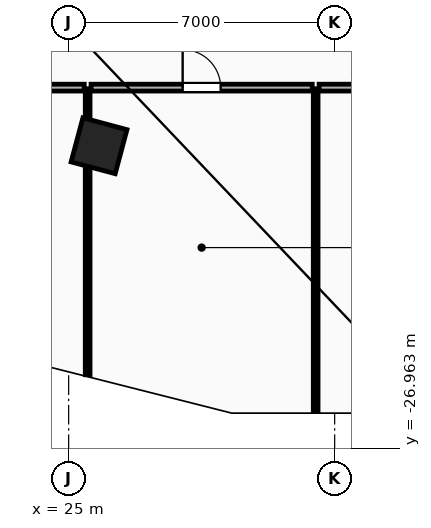
"""IFC4 building model, lengths in metres.
Left out: names, types, materials, properties, quantities, classifications, styles, units other than length and angle.
Written with IfcOpenShell. Run it as: python <this file> out.ifc"""

import sys

from ifc_helpers import new_model, si_unit, direction, frame, frame_2d, origin, origin_2d, place, context, subcontext, project, spatial, rectangle, extrude, element, fill, save


model = new_model("IFC4")
c1 = context("Model", 3, precision=1e-05, world=origin(), true_north=direction((0.0, 1.0)))
c2 = subcontext(c1, "Body", "Model", "MODEL_VIEW")
j1 = project(units=[si_unit("LENGTHUNIT", "METRE"), si_unit("PLANEANGLEUNIT", "RADIAN")], contexts=[c1])
p1 = place(None, origin())
s1 = spatial("IfcSite", under=j1, at=p1, CompositionType="ELEMENT")
p2 = place(p1, origin())
s2 = spatial("IfcBuilding", under=s1, at=p2, CompositionType="ELEMENT")
p3 = place(p2, frame((0.0, 0.0, 69.6)))
s3 = spatial("IfcBuildingStorey", under=s2, at=p3, CompositionType="ELEMENT", Elevation=69.6)
p4 = place(p3, frame((25.8, -19.0, 0.0), z_axis=(0.0, 0.0, 1.0), x_axis=(0.965970984022, -0.258650455301, 0.0)))
e1 = element("IfcColumn", 1, at=p4, inside=s3, PredefinedType="COLUMN", context=c2, shape_type="SweptSolid", body=[
    extrude(rectangle(XDim=1.2, YDim=1.2, at=origin_2d()), origin(), (0.0, 0.0, 1.0), 3.8),
])
p5 = place(p3, frame((25.5, -25.025, 0.0), z_axis=(0.0, 0.0, 1.0), x_axis=(0.0, 1.0, 0.0)))
e2 = element("IfcWall", 2, at=p5, inside=s3, PredefinedType="PARTITIONING", context=c2, shape_type="SweptSolid", body=[
    extrude(rectangle(XDim=7.525, YDim=0.125, at=frame_2d((3.762, 0.0))), origin(), (0.0, 0.0, 1.0), 3.5),
])
p6 = place(p3, frame((31.5, -25.985, 0.0), z_axis=(0.0, 0.0, 1.0), x_axis=(0.0, 1.0, 0.0)))
e3 = element("IfcWall", 3, at=p6, inside=s3, PredefinedType="PARTITIONING", context=c2, shape_type="SweptSolid", body=[
    extrude(rectangle(XDim=8.485, YDim=0.125, at=frame_2d((4.243, 0.0))), origin(), (0.0, 0.0, 1.0), 3.5),
])
p7 = place(p3, frame((25.59, -17.47, 0.0), z_axis=(0.0, 0.0, 1.0), x_axis=(1.0, 0.0, 0.0)))
e4 = element("IfcWall", 4, at=p7, inside=s3, PredefinedType="PARTITIONING", context=c2, shape_type="SweptSolid", body=[
    extrude(rectangle(XDim=5.82, YDim=0.18, at=frame_2d((2.91, 0.0))), origin(), (0.0, 0.0, 1.0), 3.5),
])
p8 = place(p7, frame((2.41, 0.0, 0.0)))
e5 = element("IfcOpeningElement", 5, at=p8, cuts=e4, PredefinedType="OPENING", context=c2, shape_type="SweptSolid", body=[
    extrude(rectangle(XDim=1.0, YDim=2.15, at=frame_2d((0.5, 1.075))), frame((0.0, 0.1, 0.0), z_axis=(0.0, -1.0, 0.0), x_axis=(1.0, 0.0, 0.0)), (0.0, 0.0, 1.0), 0.2),
])
p9 = place(p3, frame((16.822, -17.47, 0.0), z_axis=(0.0, 0.0, 1.0), x_axis=(1.0, 0.0, 0.0)))
e6 = element("IfcWall", 6, at=p9, inside=s3, PredefinedType="PARTITIONING", context=c2, shape_type="SweptSolid", body=[
    extrude(rectangle(XDim=8.588, YDim=0.18, at=frame_2d((4.294, 0.0))), origin(), (0.0, 0.0, 1.0), 3.5),
])
p10 = place(p3, frame((31.59, -17.47, 0.0), z_axis=(0.0, 0.0, 1.0), x_axis=(1.0, 0.0, 0.0)))
e7 = element("IfcWall", 7, at=p10, inside=s3, PredefinedType="PARTITIONING", context=c2, shape_type="SweptSolid", body=[
    extrude(rectangle(XDim=2.038, YDim=0.18, at=frame_2d((1.019, 0.0))), origin(), (0.0, 0.0, 1.0), 3.5),
])
p11 = place(p8, origin())
e8 = element("IfcDoor", 8, at=p11, inside=s3, OperationType="SINGLE_SWING_LEFT", PredefinedType="DOOR", context=c2, shape_type="SweptSolid", body=[
    extrude(rectangle(XDim=1.0, YDim=2.15, at=frame_2d((0.5, 1.075))), frame((0.0, 0.025, 0.0), z_axis=(0.0, -1.0, 0.0), x_axis=(1.0, 0.0, 0.0)), (0.0, 0.0, 1.0), 0.05),
])
fill(e5, e8)
save(model, sys.argv[1])
